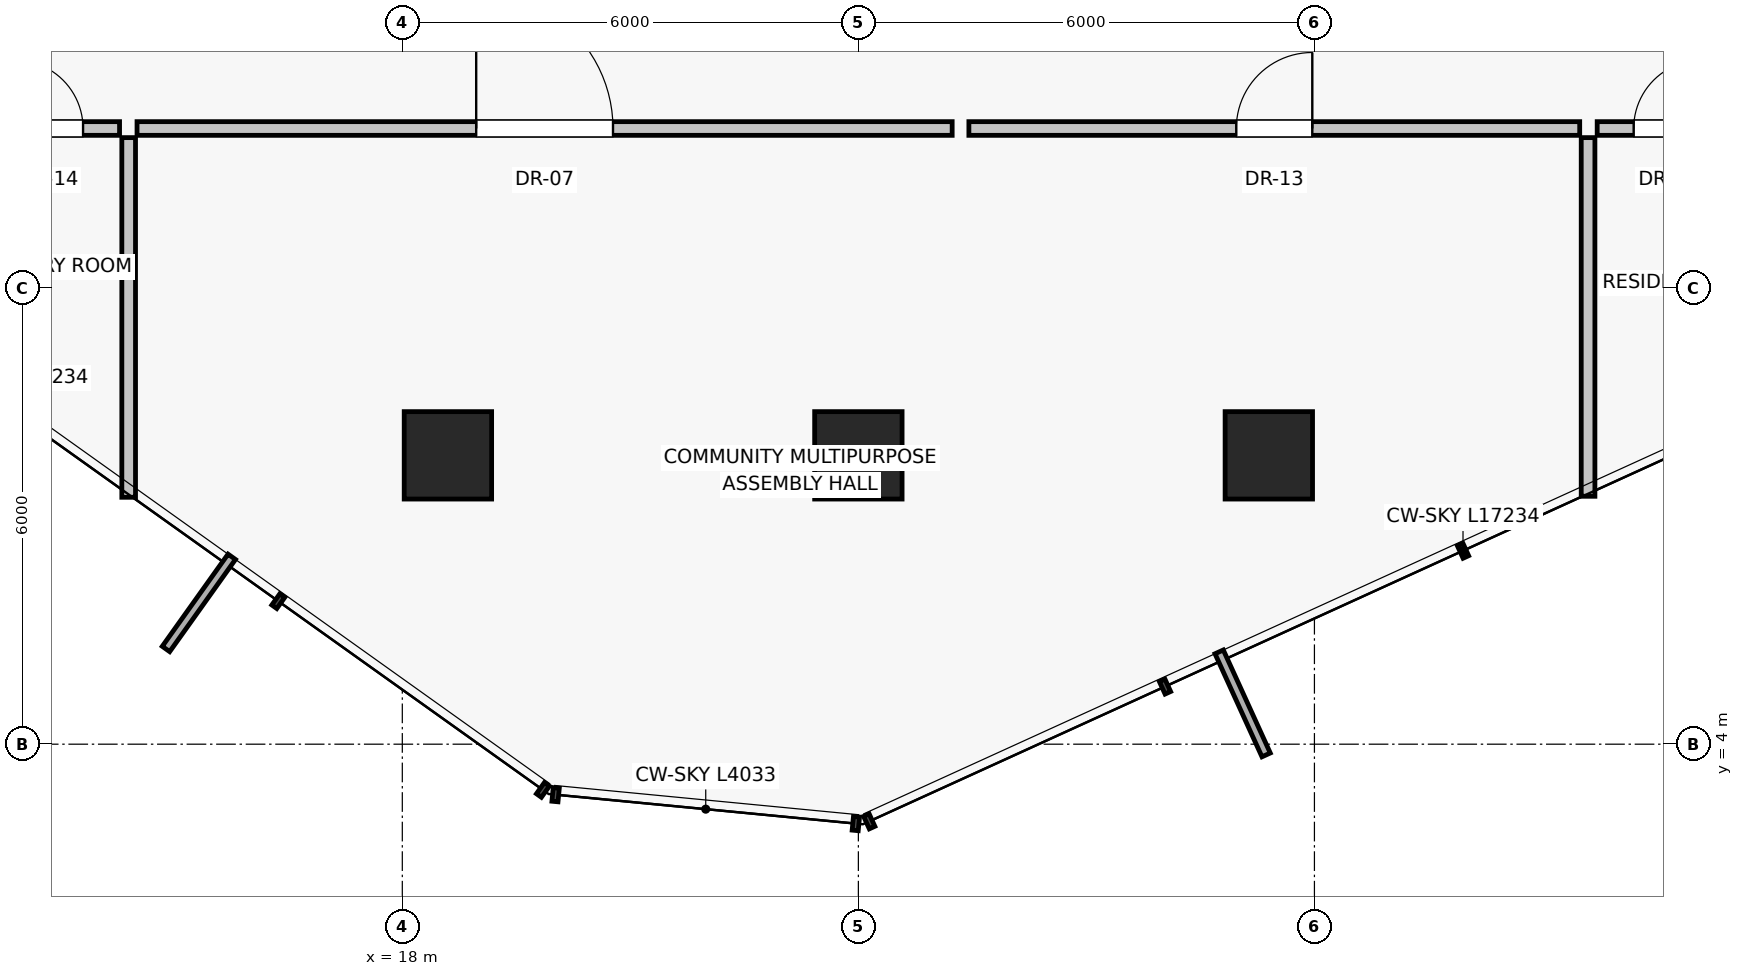
"""IFC4 building model, lengths in metres.
Left out: names, types, materials, properties, quantities, classifications, styles, units other than length and angle.
Written with IfcOpenShell. Run it as: python <this file> out.ifc"""

import sys

from ifc_helpers import new_model, si_unit, direction, frame, frame_2d, origin, origin_2d, place, context, subcontext, project, spatial, rectangle, extrude, source, transform, mapped, element, fill, save


model = new_model("IFC4")
c1 = context("Model", 3, precision=1e-05, world=origin(), true_north=direction((0.0, 1.0)))
c2 = subcontext(c1, "Body", "Model", "MODEL_VIEW")
j1 = project(units=[si_unit("LENGTHUNIT", "METRE"), si_unit("PLANEANGLEUNIT", "RADIAN")], contexts=[c1])
p1 = place(None, origin())
s1 = spatial("IfcSite", under=j1, at=p1, CompositionType="ELEMENT")
p2 = place(p1, origin())
s2 = spatial("IfcBuilding", under=s1, at=p2, CompositionType="ELEMENT")
p3 = place(p2, frame((0.0, 0.0, 108.95)))
s3 = spatial("IfcBuildingStorey", under=s2, at=p3, CompositionType="ELEMENT", Elevation=108.95)
for number, where, z_axis, x_axis in (
    (1, (18.6, 7.8, 0.0), (0.0, 0.0, 1.0), (1.0, 0.0, 0.0)),
    (2, (24.0, 7.8, 0.0), (0.0, 0.0, 1.0), (1.0, 0.0, 0.0)),
    (3, (29.4, 7.8, 0.0), (0.0, 0.0, 1.0), (1.0, 0.0, 0.0)),
):
    element("IfcColumn", number, at=place(p3, frame(where, z_axis=z_axis, x_axis=x_axis)), inside=s3, PredefinedType="COLUMN", context=c2, shape_type="SweptSolid", body=[
        extrude(rectangle(XDim=1.15, YDim=1.15, at=origin_2d()), origin(), (0.0, 0.0, 1.0), 4.3),
    ])
p4 = place(p3, frame((14.4, 11.98, 0.0), z_axis=(0.0, 0.0, 1.0), x_axis=(0.0, -1.0, 0.0)))
e4 = element("IfcWall", 4, at=p4, inside=s3, PredefinedType="PARTITIONING", context=c2, shape_type="SweptSolid", body=[
    extrude(rectangle(XDim=4.732, YDim=0.18, at=frame_2d((2.366, 0.0))), origin(), (0.0, 0.0, 1.0), 4.05),
])
p5 = place(p3, frame((33.6, 11.98, 0.0), z_axis=(0.0, 0.0, 1.0), x_axis=(0.0, -1.0, 0.0)))
e5 = element("IfcWall", 5, at=p5, inside=s3, PredefinedType="PARTITIONING", context=c2, shape_type="SweptSolid", body=[
    extrude(rectangle(XDim=4.719, YDim=0.18, at=frame_2d((2.359, 0.0))), origin(), (0.0, 0.0, 1.0), 4.05),
])
p6 = place(p3, frame((14.51, 12.1, 0.0), z_axis=(0.0, 0.0, 1.0), x_axis=(1.0, 0.0, 0.0)))
e6 = element("IfcWall", 6, at=p6, inside=s3, PredefinedType="PARTITIONING", context=c2, shape_type="SweptSolid", body=[
    extrude(rectangle(XDim=10.724, YDim=0.18, at=frame_2d((5.362, 0.0))), origin(), (0.0, 0.0, 1.0), 3.63),
])
p7 = place(p6, frame((4.462, 0.0, 0.0)))
e7 = element("IfcOpeningElement", 7, at=p7, cuts=e6, PredefinedType="OPENING", context=c2, shape_type="SweptSolid", body=[
    extrude(rectangle(XDim=1.8, YDim=2.25, at=frame_2d((0.9, 1.125))), frame((0.0, 0.1, 0.0), z_axis=(0.0, -1.0, 0.0), x_axis=(1.0, 0.0, 0.0)), (0.0, 0.0, 1.0), 0.2),
])
p8 = place(p3, frame((25.454, 12.1, 0.0), z_axis=(0.0, 0.0, 1.0), x_axis=(1.0, 0.0, 0.0)))
e8 = element("IfcWall", 8, at=p8, inside=s3, PredefinedType="PARTITIONING", context=c2, shape_type="SweptSolid", body=[
    extrude(rectangle(XDim=8.036, YDim=0.18, at=frame_2d((4.018, 0.0))), origin(), (0.0, 0.0, 1.0), 3.63),
])
p9 = place(p8, frame((3.518, 0.0, 0.0)))
e9 = element("IfcOpeningElement", 9, at=p9, cuts=e8, PredefinedType="OPENING", context=c2, shape_type="SweptSolid", body=[
    extrude(rectangle(XDim=1.0, YDim=2.01, at=frame_2d((0.5, 1.005))), frame((0.0, 0.1, 0.0), z_axis=(0.0, -1.0, 0.0), x_axis=(1.0, 0.0, 0.0)), (0.0, 0.0, 1.0), 0.2),
])
p10 = place(p3, frame((12.42, 12.1, 0.0), z_axis=(0.0, 0.0, 1.0), x_axis=(1.0, 0.0, 0.0)))
e10 = element("IfcWall", 10, at=p10, inside=s3, PredefinedType="PARTITIONING", context=c2, shape_type="SweptSolid", body=[
    extrude(rectangle(XDim=1.86, YDim=0.18, at=frame_2d((0.93, 0.0))), origin(), (0.0, 0.0, 1.0), 4.05),
])
p11 = place(p10, frame((0.48, 0.0, 0.0)))
e11 = element("IfcOpeningElement", 11, at=p11, cuts=e10, PredefinedType="OPENING", context=c2, shape_type="SweptSolid", body=[
    extrude(rectangle(XDim=0.9, YDim=2.01, at=frame_2d((0.45, 1.005))), frame((0.0, 0.1, 0.0), z_axis=(0.0, -1.0, 0.0), x_axis=(1.0, 0.0, 0.0)), (0.0, 0.0, 1.0), 0.2),
])
p12 = place(p3, frame((33.72, 12.1, 0.0), z_axis=(0.0, 0.0, 1.0), x_axis=(1.0, 0.0, 0.0)))
e12 = element("IfcWall", 12, at=p12, inside=s3, PredefinedType="PARTITIONING", context=c2, shape_type="SweptSolid", body=[
    extrude(rectangle(XDim=1.86, YDim=0.18, at=frame_2d((0.93, 0.0))), origin(), (0.0, 0.0, 1.0), 4.05),
])
p13 = place(p12, frame((0.48, 0.0, 0.0)))
e13 = element("IfcOpeningElement", 13, at=p13, cuts=e12, PredefinedType="OPENING", context=c2, shape_type="SweptSolid", body=[
    extrude(rectangle(XDim=0.9, YDim=2.01, at=frame_2d((0.45, 1.005))), frame((0.0, 0.1, 0.0), z_axis=(0.0, -1.0, 0.0), x_axis=(1.0, 0.0, 0.0)), (0.0, 0.0, 1.0), 0.2),
])
m1 = source(origin(), c2, "Body", "SweptSolid", [
    extrude(rectangle(XDim=1.8, YDim=2.25, at=frame_2d((0.9, 1.125))), frame((0.0, 0.025, 0.0), z_axis=(0.0, -1.0, 0.0), x_axis=(1.0, 0.0, 0.0)), (0.0, 0.0, 1.0), 0.05),
])
p14 = place(p7, origin())
e14 = element("IfcDoor", 14, at=p14, inside=s3, OperationType="SINGLE_SWING_LEFT", PredefinedType="DOOR", context=c2, shape_type="MappedRepresentation", body=[
    mapped(m1, transform((0.0, 0.0, 0.0), scale=1.0)),
])
fill(e7, e14)
m2 = source(origin(), c2, "Body", "SweptSolid", [
    extrude(rectangle(XDim=1.0, YDim=2.01, at=frame_2d((0.5, 1.005))), frame((0.0, 0.025, 0.0), z_axis=(0.0, -1.0, 0.0), x_axis=(1.0, 0.0, 0.0)), (0.0, 0.0, 1.0), 0.05),
])
p15 = place(p9, origin())
e15 = element("IfcDoor", 15, at=p15, inside=s3, OperationType="SINGLE_SWING_RIGHT", PredefinedType="DOOR", context=c2, shape_type="MappedRepresentation", body=[
    mapped(m2, transform((0.0, 0.0, 0.0), scale=1.0)),
])
fill(e9, e15)
m3 = source(origin(), c2, "Body", "SweptSolid", [
    extrude(rectangle(XDim=0.9, YDim=2.01, at=frame_2d((0.45, 1.005))), frame((0.0, 0.025, 0.0), z_axis=(0.0, -1.0, 0.0), x_axis=(1.0, 0.0, 0.0)), (0.0, 0.0, 1.0), 0.05),
])
p16 = place(p11, origin())
e16 = element("IfcDoor", 16, at=p16, inside=s3, OperationType="SINGLE_SWING_LEFT", PredefinedType="DOOR", context=c2, shape_type="MappedRepresentation", body=[
    mapped(m3, transform((0.0, 0.0, 0.0), scale=1.0)),
])
fill(e11, e16)
p17 = place(p13, origin())
e17 = element("IfcDoor", 17, at=p17, inside=s3, OperationType="SINGLE_SWING_RIGHT", PredefinedType="DOOR", context=c2, shape_type="MappedRepresentation", body=[
    mapped(m3, transform((0.0, 0.0, 0.0), scale=1.0)),
])
fill(e13, e17)
save(model, sys.argv[1])
